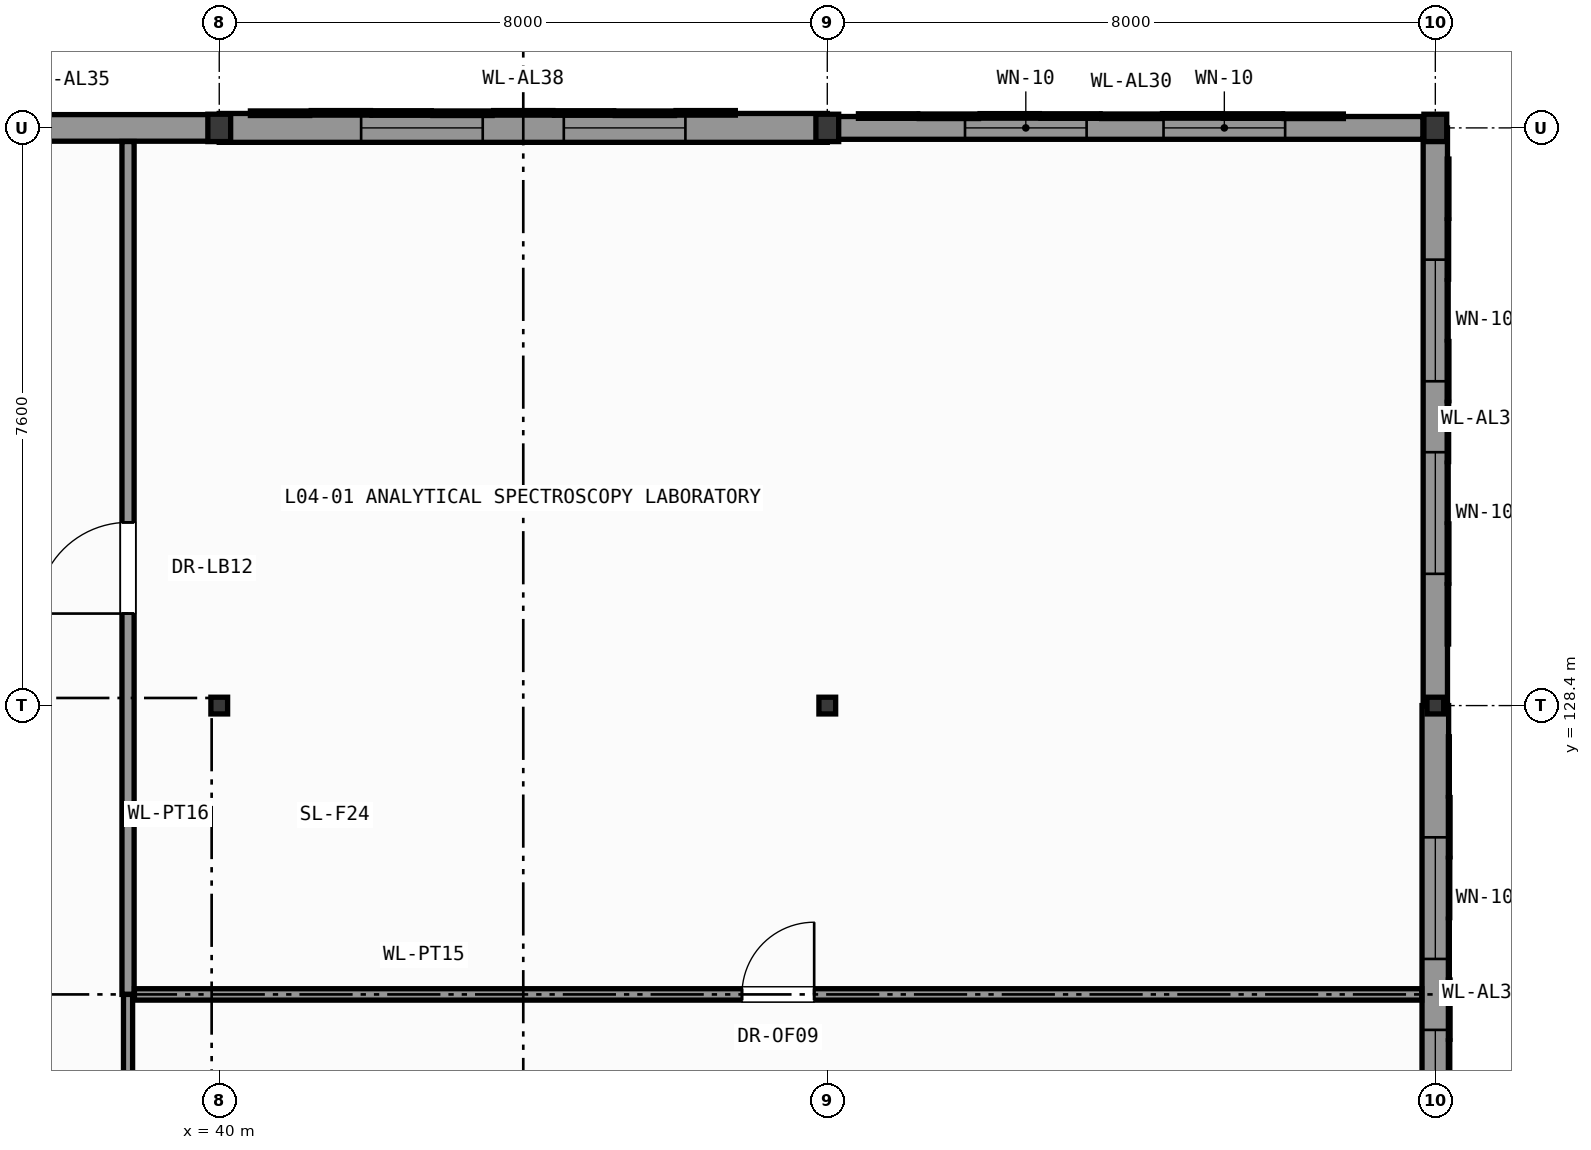
"""IFC4 building model, lengths in metres.
Left out: names, types, materials, properties, quantities, classifications, styles, units other than length and angle.
Written with IfcOpenShell. Run it as: python <this file> out.ifc"""

import sys

from ifc_helpers import new_model, si_unit, direction, frame, frame_2d, origin, origin_2d, place, context, subcontext, project, spatial, rectangle, hollow_rectangle, i_section, extrude, element, fill, save


model = new_model("IFC4")
c1 = context("Model", 3, precision=1e-05, world=origin(), true_north=direction((0.0, 1.0)))
c2 = subcontext(c1, "Body", "Model", "MODEL_VIEW")
j1 = project(units=[si_unit("LENGTHUNIT", "METRE"), si_unit("PLANEANGLEUNIT", "RADIAN")], contexts=[c1])
p1 = place(None, origin())
s1 = spatial("IfcSite", under=j1, at=p1, CompositionType="ELEMENT")
p2 = place(p1, origin())
s2 = spatial("IfcBuilding", under=s1, at=p2, CompositionType="ELEMENT")
p3 = place(p2, frame((0.0, 0.0, 18.0)))
s3 = spatial("IfcBuildingStorey", under=s2, at=p3, CompositionType="ELEMENT", Elevation=18.0)
p4 = place(p3, frame((40.0, 128.4, 0.0), z_axis=(0.0, 0.0, 1.0), x_axis=(1.0, 0.0, 0.0)))
e1 = element("IfcColumn", 1, at=p4, inside=s3, PredefinedType="COLUMN", context=c2, shape_type="SweptSolid", body=[
    extrude(hollow_rectangle(XDim=0.22, YDim=0.22, WallThickness=0.012, InnerFilletRadius=0.012, OuterFilletRadius=0.024, at=origin_2d()), origin(), (0.0, 0.0, 1.0), 4.2),
])
p5 = place(p3, frame((40.0, 136.0, 0.0), z_axis=(0.0, 0.0, 1.0), x_axis=(1.0, 0.0, 0.0)))
e2 = element("IfcColumn", 2, at=p5, inside=s3, PredefinedType="COLUMN", context=c2, shape_type="SweptSolid", body=[
    extrude(i_section(OverallWidth=0.3, OverallDepth=0.36, WebThickness=0.012, FlangeThickness=0.022, FilletRadius=0.027, at=origin_2d()), origin(), (0.0, 0.0, 1.0), 4.2),
])
p6 = place(p3, frame((48.0, 128.4, 0.0), z_axis=(0.0, 0.0, 1.0), x_axis=(1.0, 0.0, 0.0)))
e3 = element("IfcColumn", 3, at=p6, inside=s3, PredefinedType="COLUMN", context=c2, shape_type="SweptSolid", body=[
    extrude(hollow_rectangle(XDim=0.22, YDim=0.22, WallThickness=0.012, InnerFilletRadius=0.012, OuterFilletRadius=0.024, at=origin_2d()), origin(), (0.0, 0.0, 1.0), 4.2),
])
p7 = place(p3, frame((48.0, 136.0, 0.0), z_axis=(0.0, 0.0, 1.0), x_axis=(1.0, 0.0, 0.0)))
e4 = element("IfcColumn", 4, at=p7, inside=s3, PredefinedType="COLUMN", context=c2, shape_type="SweptSolid", body=[
    extrude(i_section(OverallWidth=0.3, OverallDepth=0.36, WebThickness=0.012, FlangeThickness=0.022, FilletRadius=0.027, at=origin_2d()), origin(), (0.0, 0.0, 1.0), 4.2),
])
p8 = place(p3, frame((56.0, 128.4, 0.0), z_axis=(0.0, 0.0, 1.0), x_axis=(1.0, 0.0, 0.0)))
e5 = element("IfcColumn", 5, at=p8, inside=s3, PredefinedType="COLUMN", context=c2, shape_type="SweptSolid", body=[
    extrude(hollow_rectangle(XDim=0.22, YDim=0.22, WallThickness=0.012, InnerFilletRadius=0.012, OuterFilletRadius=0.024, at=origin_2d()), origin(), (0.0, 0.0, 1.0), 4.2),
])
p9 = place(p3, frame((56.0, 136.0, 0.0), z_axis=(0.0, 0.0, 1.0), x_axis=(1.0, 0.0, 0.0)))
e6 = element("IfcColumn", 6, at=p9, inside=s3, PredefinedType="COLUMN", context=c2, shape_type="SweptSolid", body=[
    extrude(i_section(OverallWidth=0.3, OverallDepth=0.36, WebThickness=0.012, FlangeThickness=0.022, FilletRadius=0.027, at=origin_2d()), origin(), (0.0, 0.0, 1.0), 4.2),
])
p10 = place(p3, frame((56.0, 128.4, 0.0), z_axis=(0.0, 0.0, 1.0), x_axis=(0.0, -1.0, 0.0)))
e7 = element("IfcWall", 7, at=p10, inside=s3, PredefinedType="SOLIDWALL", context=c2, shape_type="SweptSolid", body=[
    extrude(rectangle(XDim=7.6, YDim=0.35, at=frame_2d((3.8, 0.0))), origin(), (0.0, 0.0, 1.0), 3.485),
])
p11 = place(p10, frame((1.733, 0.0, 0.95)))
e8 = element("IfcOpeningElement", 8, at=p11, cuts=e7, PredefinedType="OPENING", context=c2, shape_type="SweptSolid", body=[
    extrude(rectangle(XDim=1.6, YDim=2.13, at=frame_2d((0.8, 1.065))), frame((0.0, 0.185, 0.0), z_axis=(0.0, -1.0, 0.0), x_axis=(1.0, 0.0, 0.0)), (0.0, 0.0, 1.0), 0.37),
])
p12 = place(p10, frame((4.267, 0.0, 0.95)))
e9 = element("IfcOpeningElement", 9, at=p12, cuts=e7, PredefinedType="OPENING", context=c2, shape_type="SweptSolid", body=[
    extrude(rectangle(XDim=1.6, YDim=2.13, at=frame_2d((0.8, 1.065))), frame((0.0, 0.185, 0.0), z_axis=(0.0, -1.0, 0.0), x_axis=(1.0, 0.0, 0.0)), (0.0, 0.0, 1.0), 0.37),
])
p13 = place(p3, frame((56.0, 136.0, 0.0), z_axis=(0.0, 0.0, 1.0), x_axis=(0.0, -1.0, 0.0)))
e10 = element("IfcWall", 10, at=p13, inside=s3, PredefinedType="SOLIDWALL", context=c2, shape_type="SweptSolid", body=[
    extrude(rectangle(XDim=7.6, YDim=0.32, at=frame_2d((3.8, 0.0))), origin(), (0.0, 0.0, 1.0), 3.485),
])
p14 = place(p13, frame((1.733, 0.0, 0.95)))
e11 = element("IfcOpeningElement", 11, at=p14, cuts=e10, PredefinedType="OPENING", context=c2, shape_type="SweptSolid", body=[
    extrude(rectangle(XDim=1.6, YDim=2.13, at=frame_2d((0.8, 1.065))), frame((0.0, 0.17, 0.0), z_axis=(0.0, -1.0, 0.0), x_axis=(1.0, 0.0, 0.0)), (0.0, 0.0, 1.0), 0.34),
])
p15 = place(p13, frame((4.267, 0.0, 0.95)))
e12 = element("IfcOpeningElement", 12, at=p15, cuts=e10, PredefinedType="OPENING", context=c2, shape_type="SweptSolid", body=[
    extrude(rectangle(XDim=1.6, YDim=2.13, at=frame_2d((0.8, 1.065))), frame((0.0, 0.17, 0.0), z_axis=(0.0, -1.0, 0.0), x_axis=(1.0, 0.0, 0.0)), (0.0, 0.0, 1.0), 0.34),
])
p16 = place(p3, frame((48.0, 136.0, 0.0), z_axis=(0.0, 0.0, 1.0), x_axis=(1.0, 0.0, 0.0)))
e13 = element("IfcWall", 13, at=p16, inside=s3, PredefinedType="SOLIDWALL", context=c2, shape_type="SweptSolid", body=[
    extrude(rectangle(XDim=7.836, YDim=0.3, at=frame_2d((3.918, 0.0))), origin(), (0.0, 0.0, 1.0), 3.595),
])
p17 = place(p16, frame((1.812, 0.0, 0.95)))
e14 = element("IfcOpeningElement", 14, at=p17, cuts=e13, PredefinedType="OPENING", context=c2, shape_type="SweptSolid", body=[
    extrude(rectangle(XDim=1.6, YDim=2.2, at=frame_2d((0.8, 1.1))), frame((0.0, 0.16, 0.0), z_axis=(0.0, -1.0, 0.0), x_axis=(1.0, 0.0, 0.0)), (0.0, 0.0, 1.0), 0.32),
])
p18 = place(p16, frame((4.424, 0.0, 0.95)))
e15 = element("IfcOpeningElement", 15, at=p18, cuts=e13, PredefinedType="OPENING", context=c2, shape_type="SweptSolid", body=[
    extrude(rectangle(XDim=1.6, YDim=2.2, at=frame_2d((0.8, 1.1))), frame((0.0, 0.16, 0.0), z_axis=(0.0, -1.0, 0.0), x_axis=(1.0, 0.0, 0.0)), (0.0, 0.0, 1.0), 0.32),
])
p19 = place(p3, frame((40.0, 136.0, 0.0), z_axis=(0.0, 0.0, 1.0), x_axis=(1.0, 0.0, 0.0)))
e16 = element("IfcWall", 16, at=p19, inside=s3, PredefinedType="SOLIDWALL", context=c2, shape_type="SweptSolid", body=[
    extrude(rectangle(XDim=8.0, YDim=0.38, at=frame_2d((4.0, 0.0))), origin(), (0.0, 0.0, 1.0), 3.595),
])
p20 = place(p19, frame((1.867, 0.0, 0.95)))
e17 = element("IfcOpeningElement", 17, at=p20, cuts=e16, PredefinedType="OPENING", context=c2, shape_type="SweptSolid", body=[
    extrude(rectangle(XDim=1.6, YDim=2.2, at=frame_2d((0.8, 1.1))), frame((0.0, 0.2, 0.0), z_axis=(0.0, -1.0, 0.0), x_axis=(1.0, 0.0, 0.0)), (0.0, 0.0, 1.0), 0.4),
])
p21 = place(p19, frame((4.533, 0.0, 0.95)))
e18 = element("IfcOpeningElement", 18, at=p21, cuts=e16, PredefinedType="OPENING", context=c2, shape_type="SweptSolid", body=[
    extrude(rectangle(XDim=1.6, YDim=2.2, at=frame_2d((0.8, 1.1))), frame((0.0, 0.2, 0.0), z_axis=(0.0, -1.0, 0.0), x_axis=(1.0, 0.0, 0.0)), (0.0, 0.0, 1.0), 0.4),
])
p22 = place(p3, frame((36.56, 136.0, 0.0), z_axis=(0.0, 0.0, 1.0), x_axis=(1.0, 0.0, 0.0)))
e19 = element("IfcWall", 19, at=p22, inside=s3, PredefinedType="SOLIDWALL", context=c2, shape_type="SweptSolid", body=[
    extrude(rectangle(XDim=3.44, YDim=0.35, at=frame_2d((1.72, 0.0))), origin(), (0.0, 0.0, 1.0), 3.98),
])
p23 = place(p3, frame((38.8, 124.6, 0.0), z_axis=(0.0, 0.0, 1.0), x_axis=(0.0, 1.0, 0.0)))
e20 = element("IfcWall", 20, at=p23, inside=s3, PredefinedType="PARTITIONING", context=c2, shape_type="SweptSolid", body=[
    extrude(rectangle(XDim=11.221, YDim=0.16, at=frame_2d((5.61, 0.0))), origin(), (0.0, 0.0, 1.0), 3.98),
])
p24 = place(p23, frame((5.01, 0.0, 0.0)))
e21 = element("IfcOpeningElement", 21, at=p24, cuts=e20, PredefinedType="OPENING", context=c2, shape_type="SweptSolid", body=[
    extrude(rectangle(XDim=1.2, YDim=2.2, at=frame_2d((0.6, 1.1))), frame((0.0, 0.09, 0.0), z_axis=(0.0, -1.0, 0.0), x_axis=(1.0, 0.0, 0.0)), (0.0, 0.0, 1.0), 0.18),
])
p25 = place(p3, frame((38.884, 124.6, 0.0), z_axis=(0.0, 0.0, 1.0), x_axis=(1.0, 0.0, 0.0)))
e22 = element("IfcWall", 22, at=p25, inside=s3, PredefinedType="PARTITIONING", context=c2, shape_type="SweptSolid", body=[
    extrude(rectangle(XDim=16.937, YDim=0.15, at=frame_2d((8.469, 0.0))), origin(), (0.0, 0.0, 1.0), 3.98),
])
p26 = place(p25, frame((7.993, 0.0, 0.0)))
e23 = element("IfcOpeningElement", 23, at=p26, cuts=e22, PredefinedType="OPENING", context=c2, shape_type="SweptSolid", body=[
    extrude(rectangle(XDim=0.95, YDim=2.1, at=frame_2d((0.475, 1.05))), frame((0.0, 0.085, 0.0), z_axis=(0.0, -1.0, 0.0), x_axis=(1.0, 0.0, 0.0)), (0.0, 0.0, 1.0), 0.17),
])
p27 = place(p3, frame((38.8, 122.4, 0.0), z_axis=(0.0, 0.0, 1.0), x_axis=(0.0, 1.0, 0.0)))
e24 = element("IfcWall", 24, at=p27, inside=s3, PredefinedType="PARTITIONING", context=c2, shape_type="SweptSolid", body=[
    extrude(rectangle(XDim=2.2, YDim=0.12, at=frame_2d((1.1, 0.0))), origin(), (0.0, 0.0, 1.0), 3.98),
])
p28 = place(p11, origin())
e25 = element("IfcWindow", 25, at=p28, inside=s3, PartitioningType="SINGLE_PANEL", PredefinedType="WINDOW", context=c2, shape_type="SweptSolid", body=[
    extrude(rectangle(XDim=1.6, YDim=2.13, at=frame_2d((0.8, 1.065))), frame((0.0, 0.03, 0.0), z_axis=(0.0, -1.0, 0.0), x_axis=(1.0, 0.0, 0.0)), (0.0, 0.0, 1.0), 0.06),
])
fill(e8, e25)
p29 = place(p12, origin())
e26 = element("IfcWindow", 26, at=p29, inside=s3, PartitioningType="SINGLE_PANEL", PredefinedType="WINDOW", context=c2, shape_type="SweptSolid", body=[
    extrude(rectangle(XDim=1.6, YDim=2.13, at=frame_2d((0.8, 1.065))), frame((0.0, 0.03, 0.0), z_axis=(0.0, -1.0, 0.0), x_axis=(1.0, 0.0, 0.0)), (0.0, 0.0, 1.0), 0.06),
])
fill(e9, e26)
p30 = place(p14, origin())
e27 = element("IfcWindow", 27, at=p30, inside=s3, PartitioningType="SINGLE_PANEL", PredefinedType="WINDOW", context=c2, shape_type="SweptSolid", body=[
    extrude(rectangle(XDim=1.6, YDim=2.13, at=frame_2d((0.8, 1.065))), frame((0.0, 0.03, 0.0), z_axis=(0.0, -1.0, 0.0), x_axis=(1.0, 0.0, 0.0)), (0.0, 0.0, 1.0), 0.06),
])
fill(e11, e27)
p31 = place(p15, origin())
e28 = element("IfcWindow", 28, at=p31, inside=s3, PartitioningType="SINGLE_PANEL", PredefinedType="WINDOW", context=c2, shape_type="SweptSolid", body=[
    extrude(rectangle(XDim=1.6, YDim=2.13, at=frame_2d((0.8, 1.065))), frame((0.0, 0.03, 0.0), z_axis=(0.0, -1.0, 0.0), x_axis=(1.0, 0.0, 0.0)), (0.0, 0.0, 1.0), 0.06),
])
fill(e12, e28)
p32 = place(p17, origin())
e29 = element("IfcWindow", 29, at=p32, inside=s3, PartitioningType="SINGLE_PANEL", PredefinedType="WINDOW", context=c2, shape_type="SweptSolid", body=[
    extrude(rectangle(XDim=1.6, YDim=2.2, at=frame_2d((0.8, 1.1))), frame((0.0, 0.03, 0.0), z_axis=(0.0, -1.0, 0.0), x_axis=(1.0, 0.0, 0.0)), (0.0, 0.0, 1.0), 0.06),
])
fill(e14, e29)
p33 = place(p18, origin())
e30 = element("IfcWindow", 30, at=p33, inside=s3, PartitioningType="SINGLE_PANEL", PredefinedType="WINDOW", context=c2, shape_type="SweptSolid", body=[
    extrude(rectangle(XDim=1.6, YDim=2.2, at=frame_2d((0.8, 1.1))), frame((0.0, 0.03, 0.0), z_axis=(0.0, -1.0, 0.0), x_axis=(1.0, 0.0, 0.0)), (0.0, 0.0, 1.0), 0.06),
])
fill(e15, e30)
p34 = place(p20, origin())
e31 = element("IfcWindow", 31, at=p34, inside=s3, PartitioningType="SINGLE_PANEL", PredefinedType="WINDOW", context=c2, shape_type="SweptSolid", body=[
    extrude(rectangle(XDim=1.6, YDim=2.2, at=frame_2d((0.8, 1.1))), frame((0.0, 0.03, 0.0), z_axis=(0.0, -1.0, 0.0), x_axis=(1.0, 0.0, 0.0)), (0.0, 0.0, 1.0), 0.06),
])
fill(e17, e31)
p35 = place(p21, origin())
e32 = element("IfcWindow", 32, at=p35, inside=s3, PartitioningType="SINGLE_PANEL", PredefinedType="WINDOW", context=c2, shape_type="SweptSolid", body=[
    extrude(rectangle(XDim=1.6, YDim=2.2, at=frame_2d((0.8, 1.1))), frame((0.0, 0.03, 0.0), z_axis=(0.0, -1.0, 0.0), x_axis=(1.0, 0.0, 0.0)), (0.0, 0.0, 1.0), 0.06),
])
fill(e18, e32)
p36 = place(p24, origin())
e33 = element("IfcDoor", 33, at=p36, inside=s3, OperationType="SINGLE_SWING_LEFT", PredefinedType="DOOR", context=c2, shape_type="SweptSolid", body=[
    extrude(rectangle(XDim=1.2, YDim=2.2, at=frame_2d((0.6, 1.1))), frame((0.0, 0.025, 0.0), z_axis=(0.0, -1.0, 0.0), x_axis=(1.0, 0.0, 0.0)), (0.0, 0.0, 1.0), 0.05),
])
fill(e21, e33)
p37 = place(p26, origin())
e34 = element("IfcDoor", 34, at=p37, inside=s3, OperationType="SINGLE_SWING_RIGHT", PredefinedType="DOOR", context=c2, shape_type="SweptSolid", body=[
    extrude(rectangle(XDim=0.95, YDim=2.1, at=frame_2d((0.475, 1.05))), frame((0.0, 0.025, 0.0), z_axis=(0.0, -1.0, 0.0), x_axis=(1.0, 0.0, 0.0)), (0.0, 0.0, 1.0), 0.05),
])
fill(e23, e34)
save(model, sys.argv[1])
